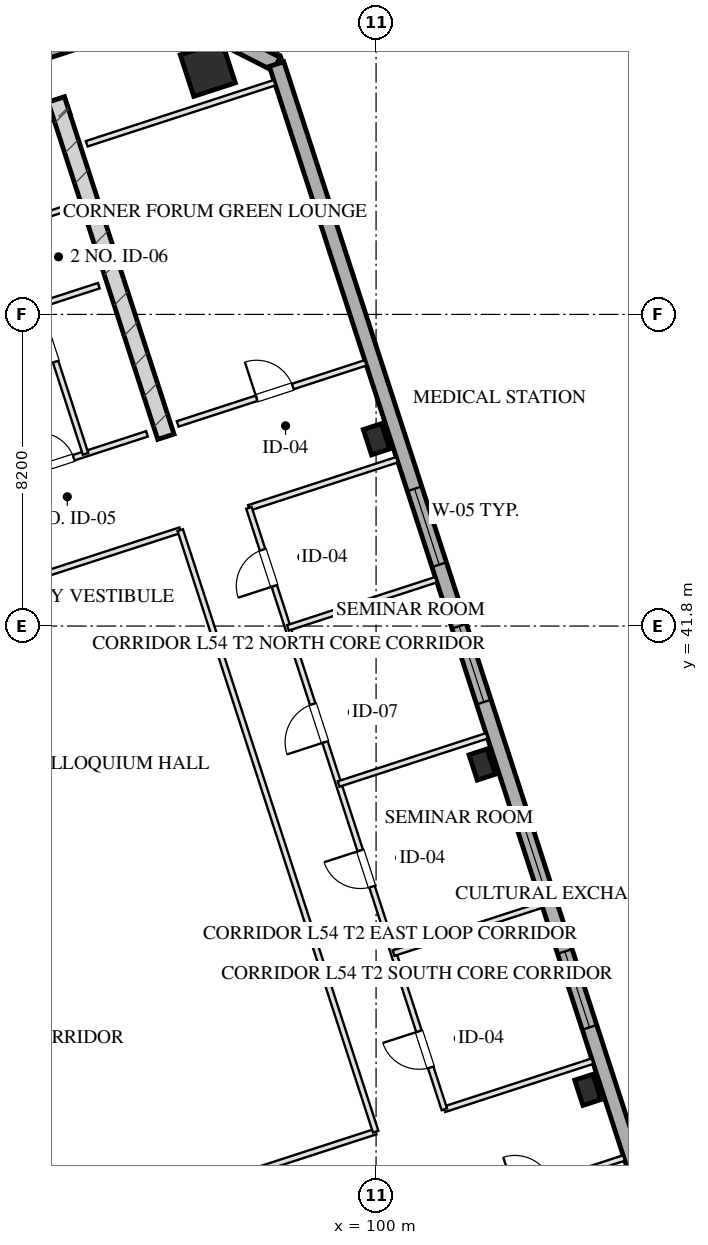
"""IFC4 building model, lengths in metres.
Left out: names, types, materials, properties, quantities, classifications, styles, units other than length and angle.
Written with IfcOpenShell. Run it as: python <this file> out.ifc"""

import sys

from ifc_helpers import new_model, si_unit, direction, frame, frame_2d, origin, origin_2d, place, context, subcontext, project, spatial, rectangle, hollow_rectangle, extrude, element, fill, save


model = new_model("IFC4")
c1 = context("Model", 3, precision=1e-05, world=origin(), true_north=direction((0.0, 1.0)))
c2 = subcontext(c1, "Body", "Model", "MODEL_VIEW")
j1 = project(units=[si_unit("LENGTHUNIT", "METRE"), si_unit("PLANEANGLEUNIT", "RADIAN")], contexts=[c1])
p1 = place(None, origin())
s1 = spatial("IfcSite", under=j1, at=p1, CompositionType="ELEMENT")
p2 = place(p1, origin())
s2 = spatial("IfcBuilding", under=s1, at=p2, CompositionType="ELEMENT")
p3 = place(p2, frame((0.0, 0.0, 202.4)))
s3 = spatial("IfcBuildingStorey", under=s2, at=p3, CompositionType="ELEMENT", Elevation=202.4)
p4 = place(p3, frame((76.415, 50.489, 0.0), z_axis=(0.0, 0.0, 1.0), x_axis=(0.951056810414, 0.309016089169, 0.0)))
e1 = element("IfcWall", 1, at=p4, inside=s3, PredefinedType="SHEAR", context=c2, shape_type="SweptSolid", body=[
    extrude(rectangle(XDim=16.25, YDim=0.45, at=frame_2d((8.125, 0.0))), origin(), (0.0, 0.0, 1.0), 3.45),
])
p5 = place(p3, frame((94.469, 46.781, 0.0), z_axis=(0.0, 0.0, 1.0), x_axis=(-0.309004419953, 0.951060601881, 0.0)))
e2 = element("IfcWall", 2, at=p5, inside=s3, PredefinedType="SHEAR", context=c2, shape_type="SweptSolid", body=[
    extrude(rectangle(XDim=9.33, YDim=0.45, at=frame_2d((4.665, 0.0))), origin(), (0.0, 0.0, 1.0), 3.45),
])
p6 = place(p3, frame((95.572, 56.461, 0.0), z_axis=(0.0, 0.0, 1.0), x_axis=(0.951056516295, 0.309016994375, 0.0)))
e3 = element("IfcColumn", 3, at=p6, inside=s3, PredefinedType="COLUMN", context=c2, shape_type="SweptSolid", body=[
    extrude(hollow_rectangle(XDim=1.15, YDim=1.15, WallThickness=0.04, at=origin_2d()), origin(), (0.0, 0.0, 1.0), 3.451),
])
for number, where, z_axis, x_axis in (
    (4, (105.573, 29.597, 0.0), (0.0, 0.0, 1.0), (0.951, 0.309, 0.0)),
    (5, (102.792, 38.156, 0.0), (0.0, 0.0, 1.0), (0.951, 0.309, 0.0)),
    (6, (100.01, 46.716, 0.0), (0.0, 0.0, 1.0), (0.951, 0.309, 0.0)),
):
    element("IfcColumn", number, at=place(p3, frame(where, z_axis=z_axis, x_axis=x_axis)), inside=s3, PredefinedType="COLUMN", context=c2, shape_type="SweptSolid", body=[
        extrude(hollow_rectangle(XDim=0.5, YDim=0.7, WallThickness=0.025, at=origin_2d()), origin(), (0.0, 0.0, 1.0), 3.451),
    ])
p7 = place(p3, frame((72.165, 50.706, 0.0), z_axis=(0.0, 0.0, 1.0), x_axis=(0.951058012937, 0.309012388148, 0.0)))
e7 = element("IfcWall", 7, at=p7, inside=s3, PredefinedType="SOLIDWALL", context=c2, shape_type="SweptSolid", body=[
    extrude(rectangle(XDim=23.6, YDim=0.4, at=frame_2d((11.8, 0.0))), origin(), (0.0, 0.0, 1.0), 2.61),
])
p8 = place(p3, frame((94.61, 57.999, 0.0), z_axis=(0.0, 0.0, 1.0), x_axis=(0.890979603174, -0.454043331334, 0.0)))
e8 = element("IfcWall", 8, at=p8, inside=s3, PredefinedType="SOLIDWALL", context=c2, shape_type="SweptSolid", body=[
    extrude(rectangle(XDim=3.111, YDim=0.4, at=frame_2d((1.556, 0.0))), origin(), (0.0, 0.0, 1.0), 2.61),
])
p9 = place(p3, frame((97.382, 56.586, 0.0), z_axis=(0.0, 0.0, 1.0), x_axis=(0.309016491071, -0.951056679828, 0.0)))
e9 = element("IfcWall", 9, at=p9, inside=s3, PredefinedType="SOLIDWALL", context=c2, shape_type="SweptSolid", body=[
    extrude(rectangle(XDim=38.4, YDim=0.4, at=frame_2d((19.2, 0.0))), origin(), (0.0, 0.0, 1.0), 2.61),
])
p10 = place(p9, frame((24.55, 0.0, 0.75)))
e10 = element("IfcOpeningElement", 10, at=p10, cuts=e9, PredefinedType="OPENING", context=c2, shape_type="SweptSolid", body=[
    extrude(rectangle(XDim=2.1, YDim=1.46, at=frame_2d((1.05, 0.73))), frame((0.0, 0.21, 0.0), z_axis=(0.0, -1.0, 0.0), x_axis=(1.0, 0.0, 0.0)), (0.0, 0.0, 1.0), 0.42),
])
p11 = place(p9, frame((20.75, 0.0, 0.75)))
e11 = element("IfcOpeningElement", 11, at=p11, cuts=e9, PredefinedType="OPENING", context=c2, shape_type="SweptSolid", body=[
    extrude(rectangle(XDim=2.1, YDim=1.46, at=frame_2d((1.05, 0.73))), frame((0.0, 0.21, 0.0), z_axis=(0.0, -1.0, 0.0), x_axis=(1.0, 0.0, 0.0)), (0.0, 0.0, 1.0), 0.42),
])
p12 = place(p9, frame((15.55, 0.0, 0.75)))
e12 = element("IfcOpeningElement", 12, at=p12, cuts=e9, PredefinedType="OPENING", context=c2, shape_type="SweptSolid", body=[
    extrude(rectangle(XDim=2.1, YDim=1.46, at=frame_2d((1.05, 0.73))), frame((0.0, 0.21, 0.0), z_axis=(0.0, -1.0, 0.0), x_axis=(1.0, 0.0, 0.0)), (0.0, 0.0, 1.0), 0.42),
])
p13 = place(p9, frame((11.75, 0.0, 0.75)))
e13 = element("IfcOpeningElement", 13, at=p13, cuts=e9, PredefinedType="OPENING", context=c2, shape_type="SweptSolid", body=[
    extrude(rectangle(XDim=2.1, YDim=1.46, at=frame_2d((1.05, 0.73))), frame((0.0, 0.21, 0.0), z_axis=(0.0, -1.0, 0.0), x_axis=(1.0, 0.0, 0.0)), (0.0, 0.0, 1.0), 0.42),
])
p14 = place(p3, frame((90.928, 45.868, 0.0), z_axis=(0.0, 0.0, 1.0), x_axis=(0.951059297078, 0.309008435874, 0.0)))
e14 = element("IfcWall", 14, at=p14, inside=s3, PredefinedType="PARTITIONING", context=c2, shape_type="SweptSolid", body=[
    extrude(rectangle(XDim=3.2, YDim=0.15, at=frame_2d((1.6, 0.0))), origin(), (0.0, 0.0, 1.0), 3.175),
])
p15 = place(p14, frame((0.22, 0.0, 0.0)))
e15 = element("IfcOpeningElement", 15, at=p15, cuts=e14, PredefinedType="OPENING", context=c2, shape_type="SweptSolid", body=[
    extrude(rectangle(XDim=0.95, YDim=2.05, at=frame_2d((0.475, 1.025))), frame((0.0, 0.085, 0.0), z_axis=(0.0, -1.0, 0.0), x_axis=(1.0, 0.0, 0.0)), (0.0, 0.0, 1.0), 0.17),
])
p16 = place(p3, frame((92.355, 46.331, 0.0), z_axis=(0.0, 0.0, 1.0), x_axis=(-0.309007490203, 0.951059604335, 0.0)))
e16 = element("IfcWall", 16, at=p16, inside=s3, PredefinedType="PARTITIONING", context=c2, shape_type="SweptSolid", body=[
    extrude(rectangle(XDim=8.43, YDim=0.15, at=frame_2d((4.215, 0.0))), origin(), (0.0, 0.0, 1.0), 3.175),
])
p17 = place(p16, frame((2.55, 0.0, 0.0)))
e17 = element("IfcOpeningElement", 17, at=p17, cuts=e16, PredefinedType="OPENING", context=c2, shape_type="SweptSolid", body=[
    extrude(rectangle(XDim=0.95, YDim=2.05, at=frame_2d((0.475, 1.025))), frame((0.0, 0.085, 0.0), z_axis=(0.0, -1.0, 0.0), x_axis=(1.0, 0.0, 0.0)), (0.0, 0.0, 1.0), 0.17),
])
p18 = place(p16, frame((4.7, 0.0, 0.0)))
e18 = element("IfcOpeningElement", 18, at=p18, cuts=e16, PredefinedType="OPENING", context=c2, shape_type="SweptSolid", body=[
    extrude(rectangle(XDim=0.9, YDim=2.05, at=frame_2d((0.45, 1.025))), frame((0.0, 0.085, 0.0), z_axis=(0.0, -1.0, 0.0), x_axis=(1.0, 0.0, 0.0)), (0.0, 0.0, 1.0), 0.17),
])
p19 = place(p16, frame((6.8, 0.0, 0.0)))
e19 = element("IfcOpeningElement", 19, at=p19, cuts=e16, PredefinedType="OPENING", context=c2, shape_type="SweptSolid", body=[
    extrude(rectangle(XDim=0.9, YDim=2.05, at=frame_2d((0.45, 1.025))), frame((0.0, 0.085, 0.0), z_axis=(0.0, -1.0, 0.0), x_axis=(1.0, 0.0, 0.0)), (0.0, 0.0, 1.0), 0.17),
])
p20 = place(p3, frame((91.088, 50.23, 0.0), z_axis=(0.0, 0.0, 1.0), x_axis=(0.951054116971, 0.309024378638, 0.0)))
e20 = element("IfcWall", 20, at=p20, inside=s3, PredefinedType="PARTITIONING", context=c2, shape_type="SweptSolid", body=[
    extrude(rectangle(XDim=1.7, YDim=0.15, at=frame_2d((0.85, 0.0))), origin(), (0.0, 0.0, 1.0), 3.175),
])
p21 = place(p3, frame((90.408, 52.323, 0.0), z_axis=(0.0, 0.0, 1.0), x_axis=(0.951040401051, 0.309066587596, 0.0)))
e21 = element("IfcWall", 21, at=p21, inside=s3, PredefinedType="PARTITIONING", context=c2, shape_type="SweptSolid", body=[
    extrude(rectangle(XDim=1.7, YDim=0.15, at=frame_2d((0.85, 0.0))), origin(), (0.0, 0.0, 1.0), 3.175),
])
p22 = place(p3, frame((101.578, 26.196, 0.0), z_axis=(0.0, 0.0, 1.0), x_axis=(0.951064427824, 0.308992644131, 0.0)))
e22 = element("IfcWall", 22, at=p22, inside=s3, PredefinedType="PARTITIONING", context=c2, shape_type="SweptSolid", body=[
    extrude(rectangle(XDim=5.2, YDim=0.15, at=frame_2d((2.6, 0.0))), origin(), (0.0, 0.0, 1.0), 3.175),
])
p23 = place(p22, frame((2.184, 0.0, 0.0)))
e23 = element("IfcOpeningElement", 23, at=p23, cuts=e22, PredefinedType="OPENING", context=c2, shape_type="SweptSolid", body=[
    extrude(rectangle(XDim=1.0, YDim=2.05, at=frame_2d((0.5, 1.025))), frame((0.0, 0.085, 0.0), z_axis=(0.0, -1.0, 0.0), x_axis=(1.0, 0.0, 0.0)), (0.0, 0.0, 1.0), 0.17),
])
p24 = place(p3, frame((92.385, 54.49, 0.0), z_axis=(0.0, 0.0, 1.0), x_axis=(0.951055112834, 0.309021313752, 0.0)))
e24 = element("IfcWall", 24, at=p24, inside=s3, PredefinedType="PARTITIONING", context=c2, shape_type="SweptSolid", body=[
    extrude(rectangle(XDim=5.2, YDim=0.15, at=frame_2d((2.6, 0.0))), origin(), (0.0, 0.0, 1.0), 3.175),
])
p25 = place(p3, frame((94.78, 47.119, 0.0), z_axis=(0.0, 0.0, 1.0), x_axis=(0.951055112834, 0.309021313752, 0.0)))
e25 = element("IfcWall", 25, at=p25, inside=s3, PredefinedType="PARTITIONING", context=c2, shape_type="SweptSolid", body=[
    extrude(rectangle(XDim=5.2, YDim=0.15, at=frame_2d((2.6, 0.0))), origin(), (0.0, 0.0, 1.0), 3.175),
])
p26 = place(p25, frame((2.184, 0.0, 0.0)))
e26 = element("IfcOpeningElement", 26, at=p26, cuts=e25, PredefinedType="OPENING", context=c2, shape_type="SweptSolid", body=[
    extrude(rectangle(XDim=1.0, YDim=2.05, at=frame_2d((0.5, 1.025))), frame((0.0, 0.085, 0.0), z_axis=(0.0, -1.0, 0.0), x_axis=(1.0, 0.0, 0.0)), (0.0, 0.0, 1.0), 0.17),
])
p27 = place(p3, frame((91.097, 25.608, 0.0), z_axis=(0.0, 0.0, 1.0), x_axis=(0.951053063704, 0.309027620156, 0.0)))
e27 = element("IfcWall", 27, at=p27, inside=s3, PredefinedType="PARTITIONING", context=c2, shape_type="SweptSolid", body=[
    extrude(rectangle(XDim=9.35, YDim=0.15, at=frame_2d((4.675, 0.0))), origin(), (0.0, 0.0, 1.0), 3.175),
])
p28 = place(p3, frame((101.796, 29.085, 0.0), z_axis=(0.0, 0.0, 1.0), x_axis=(0.951061634685, 0.309001241148, 0.0)))
e28 = element("IfcWall", 28, at=p28, inside=s3, PredefinedType="PARTITIONING", context=c2, shape_type="SweptSolid", body=[
    extrude(rectangle(XDim=4.1, YDim=0.15, at=frame_2d((2.05, 0.0))), origin(), (0.0, 0.0, 1.0), 3.175),
])
p29 = place(p3, frame((85.955, 41.434, 0.0), z_axis=(0.0, 0.0, 1.0), x_axis=(0.951053063704, 0.309027620156, 0.0)))
e29 = element("IfcWall", 29, at=p29, inside=s3, PredefinedType="PARTITIONING", context=c2, shape_type="SweptSolid", body=[
    extrude(rectangle(XDim=9.35, YDim=0.15, at=frame_2d((4.675, 0.0))), origin(), (0.0, 0.0, 1.0), 3.175),
])
p30 = place(p3, frame((96.654, 44.91, 0.0), z_axis=(0.0, 0.0, 1.0), x_axis=(0.951044133184, 0.309055103076, 0.0)))
e30 = element("IfcWall", 30, at=p30, inside=s3, PredefinedType="PARTITIONING", context=c2, shape_type="SweptSolid", body=[
    extrude(rectangle(XDim=4.1, YDim=0.15, at=frame_2d((2.05, 0.0))), origin(), (0.0, 0.0, 1.0), 3.175),
])
p31 = place(p3, frame((99.989, 28.498, 0.0), z_axis=(0.0, 0.0, 1.0), x_axis=(-0.30901773025, 0.951056277195, 0.0)))
e31 = element("IfcWall", 31, at=p31, inside=s3, PredefinedType="PARTITIONING", context=c2, shape_type="SweptSolid", body=[
    extrude(rectangle(XDim=16.64, YDim=0.15, at=frame_2d((8.32, 0.0))), origin(), (0.0, 0.0, 1.0), 3.175),
])
p32 = place(p3, frame((101.796, 29.085, 0.0), z_axis=(0.0, 0.0, 1.0), x_axis=(-0.309022042254, 0.951054876125, 0.0)))
e32 = element("IfcWall", 32, at=p32, inside=s3, PredefinedType="PARTITIONING", context=c2, shape_type="SweptSolid", body=[
    extrude(rectangle(XDim=16.64, YDim=0.15, at=frame_2d((8.32, 0.0))), origin(), (0.0, 0.0, 1.0), 3.175),
])
p33 = place(p32, frame((1.16, 0.0, 0.0)))
e33 = element("IfcOpeningElement", 33, at=p33, cuts=e32, PredefinedType="OPENING", context=c2, shape_type="SweptSolid", body=[
    extrude(rectangle(XDim=1.0, YDim=2.05, at=frame_2d((0.5, 1.025))), frame((0.0, 0.085, 0.0), z_axis=(0.0, -1.0, 0.0), x_axis=(1.0, 0.0, 0.0)), (0.0, 0.0, 1.0), 0.17),
])
p34 = place(p32, frame((6.16, 0.0, 0.0)))
e34 = element("IfcOpeningElement", 34, at=p34, cuts=e32, PredefinedType="OPENING", context=c2, shape_type="SweptSolid", body=[
    extrude(rectangle(XDim=1.0, YDim=2.05, at=frame_2d((0.5, 1.025))), frame((0.0, 0.085, 0.0), z_axis=(0.0, -1.0, 0.0), x_axis=(1.0, 0.0, 0.0)), (0.0, 0.0, 1.0), 0.17),
])
p35 = place(p32, frame((10.16, 0.0, 0.0)))
e35 = element("IfcOpeningElement", 35, at=p35, cuts=e32, PredefinedType="OPENING", context=c2, shape_type="SweptSolid", body=[
    extrude(rectangle(XDim=1.05, YDim=2.05, at=frame_2d((0.525, 1.025))), frame((0.0, 0.085, 0.0), z_axis=(0.0, -1.0, 0.0), x_axis=(1.0, 0.0, 0.0)), (0.0, 0.0, 1.0), 0.17),
])
p36 = place(p32, frame((14.48, 0.0, 0.0)))
e36 = element("IfcOpeningElement", 36, at=p36, cuts=e32, PredefinedType="OPENING", context=c2, shape_type="SweptSolid", body=[
    extrude(rectangle(XDim=1.0, YDim=2.05, at=frame_2d((0.5, 1.025))), frame((0.0, 0.085, 0.0), z_axis=(0.0, -1.0, 0.0), x_axis=(1.0, 0.0, 0.0)), (0.0, 0.0, 1.0), 0.17),
])
p37 = place(p3, frame((100.461, 33.193, 0.0), z_axis=(0.0, 0.0, 1.0), x_axis=(0.951061634685, 0.309001241148, 0.0)))
e37 = element("IfcWall", 37, at=p37, inside=s3, PredefinedType="PARTITIONING", context=c2, shape_type="SweptSolid", body=[
    extrude(rectangle(XDim=4.1, YDim=0.15, at=frame_2d((2.05, 0.0))), origin(), (0.0, 0.0, 1.0), 3.175),
])
for number, where, z_axis, x_axis in (
    (38, (99.015, 37.644, 0.0), (0.0, 0.0, 1.0), (0.951, 0.309, 0.0)),
    (39, (97.68, 41.753, 0.0), (0.0, 0.0, 1.0), (0.951, 0.309, 0.0)),
):
    element("IfcWall", number, at=place(p3, frame(where, z_axis=z_axis, x_axis=x_axis)), inside=s3, PredefinedType="PARTITIONING", context=c2, shape_type="SweptSolid", body=[
        extrude(rectangle(XDim=4.1, YDim=0.15, at=frame_2d((2.05, 0.0))), origin(), (0.0, 0.0, 1.0), 3.175),
    ])
p38 = place(p10, origin())
e40 = element("IfcWindow", 40, at=p38, inside=s3, PartitioningType="TRIPLE_PANEL_VERTICAL", PredefinedType="WINDOW", context=c2, shape_type="SweptSolid", body=[
    extrude(rectangle(XDim=2.1, YDim=1.46, at=frame_2d((1.05, 0.73))), frame((0.0, 0.03, 0.0), z_axis=(0.0, -1.0, 0.0), x_axis=(1.0, 0.0, 0.0)), (0.0, 0.0, 1.0), 0.06),
])
fill(e10, e40)
p39 = place(p11, origin())
e41 = element("IfcWindow", 41, at=p39, inside=s3, PartitioningType="TRIPLE_PANEL_VERTICAL", PredefinedType="WINDOW", context=c2, shape_type="SweptSolid", body=[
    extrude(rectangle(XDim=2.1, YDim=1.46, at=frame_2d((1.05, 0.73))), frame((0.0, 0.03, 0.0), z_axis=(0.0, -1.0, 0.0), x_axis=(1.0, 0.0, 0.0)), (0.0, 0.0, 1.0), 0.06),
])
fill(e11, e41)
p40 = place(p12, origin())
e42 = element("IfcWindow", 42, at=p40, inside=s3, PartitioningType="TRIPLE_PANEL_VERTICAL", PredefinedType="WINDOW", context=c2, shape_type="SweptSolid", body=[
    extrude(rectangle(XDim=2.1, YDim=1.46, at=frame_2d((1.05, 0.73))), frame((0.0, 0.03, 0.0), z_axis=(0.0, -1.0, 0.0), x_axis=(1.0, 0.0, 0.0)), (0.0, 0.0, 1.0), 0.06),
])
fill(e12, e42)
p41 = place(p13, origin())
e43 = element("IfcWindow", 43, at=p41, inside=s3, PartitioningType="TRIPLE_PANEL_VERTICAL", PredefinedType="WINDOW", context=c2, shape_type="SweptSolid", body=[
    extrude(rectangle(XDim=2.1, YDim=1.46, at=frame_2d((1.05, 0.73))), frame((0.0, 0.03, 0.0), z_axis=(0.0, -1.0, 0.0), x_axis=(1.0, 0.0, 0.0)), (0.0, 0.0, 1.0), 0.06),
])
fill(e13, e43)
p42 = place(p15, origin())
e44 = element("IfcDoor", 44, at=p42, inside=s3, OperationType="SINGLE_SWING_LEFT", PredefinedType="DOOR", context=c2, shape_type="SweptSolid", body=[
    extrude(rectangle(XDim=0.95, YDim=2.05, at=frame_2d((0.475, 1.025))), frame((0.0, 0.025, 0.0), z_axis=(0.0, -1.0, 0.0), x_axis=(1.0, 0.0, 0.0)), (0.0, 0.0, 1.0), 0.05),
])
fill(e15, e44)
p43 = place(p17, origin())
e45 = element("IfcDoor", 45, at=p43, inside=s3, OperationType="SINGLE_SWING_LEFT", PredefinedType="DOOR", context=c2, shape_type="SweptSolid", body=[
    extrude(rectangle(XDim=0.95, YDim=2.05, at=frame_2d((0.475, 1.025))), frame((0.0, 0.025, 0.0), z_axis=(0.0, -1.0, 0.0), x_axis=(1.0, 0.0, 0.0)), (0.0, 0.0, 1.0), 0.05),
])
fill(e17, e45)
p44 = place(p26, origin())
e46 = element("IfcDoor", 46, at=p44, inside=s3, OperationType="SINGLE_SWING_LEFT", PredefinedType="DOOR", context=c2, shape_type="SweptSolid", body=[
    extrude(rectangle(XDim=1.0, YDim=2.05, at=frame_2d((0.5, 1.025))), frame((0.0, 0.025, 0.0), z_axis=(0.0, -1.0, 0.0), x_axis=(1.0, 0.0, 0.0)), (0.0, 0.0, 1.0), 0.05),
])
fill(e26, e46)
p45 = place(p33, origin())
e47 = element("IfcDoor", 47, at=p45, inside=s3, OperationType="SINGLE_SWING_RIGHT", PredefinedType="DOOR", context=c2, shape_type="SweptSolid", body=[
    extrude(rectangle(XDim=1.0, YDim=2.05, at=frame_2d((0.5, 1.025))), frame((0.0, 0.025, 0.0), z_axis=(0.0, -1.0, 0.0), x_axis=(1.0, 0.0, 0.0)), (0.0, 0.0, 1.0), 0.05),
])
fill(e33, e47)
p46 = place(p34, origin())
e48 = element("IfcDoor", 48, at=p46, inside=s3, OperationType="SINGLE_SWING_RIGHT", PredefinedType="DOOR", context=c2, shape_type="SweptSolid", body=[
    extrude(rectangle(XDim=1.0, YDim=2.05, at=frame_2d((0.5, 1.025))), frame((0.0, 0.025, 0.0), z_axis=(0.0, -1.0, 0.0), x_axis=(1.0, 0.0, 0.0)), (0.0, 0.0, 1.0), 0.05),
])
fill(e34, e48)
p47 = place(p35, origin())
e49 = element("IfcDoor", 49, at=p47, inside=s3, OperationType="SINGLE_SWING_LEFT", PredefinedType="DOOR", context=c2, shape_type="SweptSolid", body=[
    extrude(rectangle(XDim=1.05, YDim=2.05, at=frame_2d((0.525, 1.025))), frame((0.0, 0.025, 0.0), z_axis=(0.0, -1.0, 0.0), x_axis=(1.0, 0.0, 0.0)), (0.0, 0.0, 1.0), 0.05),
])
fill(e35, e49)
p48 = place(p36, origin())
e50 = element("IfcDoor", 50, at=p48, inside=s3, OperationType="SINGLE_SWING_LEFT", PredefinedType="DOOR", context=c2, shape_type="SweptSolid", body=[
    extrude(rectangle(XDim=1.0, YDim=2.05, at=frame_2d((0.5, 1.025))), frame((0.0, 0.025, 0.0), z_axis=(0.0, -1.0, 0.0), x_axis=(1.0, 0.0, 0.0)), (0.0, 0.0, 1.0), 0.05),
])
fill(e36, e50)
save(model, sys.argv[1])
